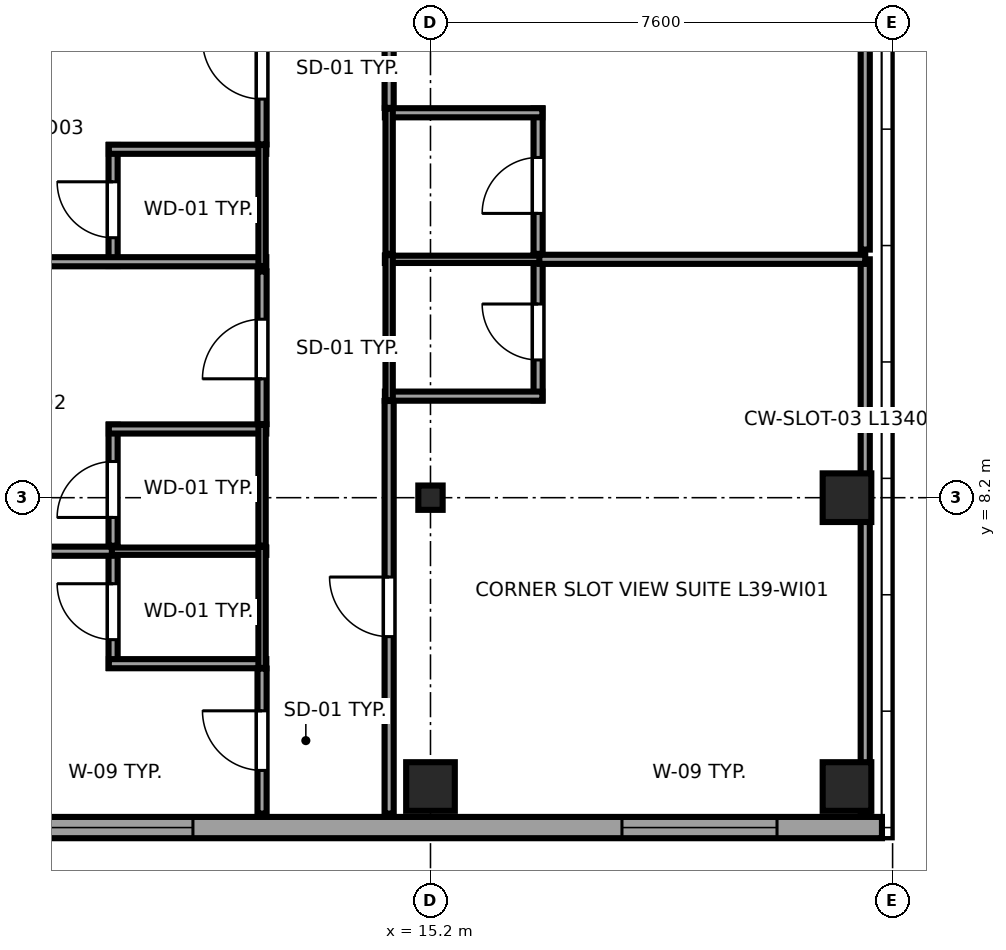
"""IFC4 building model, lengths in metres.
Left out: names, types, materials, properties, quantities, classifications, styles, units other than length and angle.
Written with IfcOpenShell. Run it as: python <this file> out.ifc"""

import sys

from ifc_helpers import new_model, si_unit, direction, frame, frame_2d, origin, origin_2d, place, context, subcontext, project, spatial, rectangle, i_section, extrude, source, transform, mapped, element, fill, save


model = new_model("IFC4")
c1 = context("Model", 3, precision=1e-05, world=origin(), true_north=direction((0.0, 1.0)))
c2 = subcontext(c1, "Body", "Model", "MODEL_VIEW")
j1 = project(units=[si_unit("LENGTHUNIT", "METRE"), si_unit("PLANEANGLEUNIT", "RADIAN")], contexts=[c1])
p1 = place(None, origin())
s1 = spatial("IfcSite", under=j1, at=p1, CompositionType="ELEMENT")
p2 = place(p1, origin())
s2 = spatial("IfcBuilding", under=s1, at=p2, CompositionType="ELEMENT")
p3 = place(p2, frame((0.0, 0.0, 150.6)))
s3 = spatial("IfcBuildingStorey", under=s2, at=p3, CompositionType="ELEMENT", Elevation=150.6)
m1 = source(origin(), c2, "Body", "SweptSolid", [
    extrude(rectangle(XDim=0.8, YDim=0.8, at=origin_2d()), origin(), (0.0, 0.0, 1.0), 3.55),
])
p4 = place(p3, frame((15.2, 3.45, 0.0), z_axis=(0.0, 0.0, 1.0), x_axis=(1.0, 0.0, 0.0)))
e1 = element("IfcColumn", 1, at=p4, inside=s3, PredefinedType="COLUMN", context=c2, shape_type="MappedRepresentation", body=[
    mapped(m1, transform((0.0, 0.0, 0.0), x_axis=(1.0, 0.0, 0.0), y_axis=(0.0, 1.0, 0.0), z_axis=(0.0, 0.0, 1.0), scale=1.0)),
])
m2 = source(origin(), c2, "Body", "SweptSolid", [
    extrude(i_section(OverallWidth=0.4, OverallDepth=0.4, WebThickness=0.02, FlangeThickness=0.035, at=origin_2d()), origin(), (0.0, 0.0, 1.0), 3.55),
])
p5 = place(p3, frame((15.2, 8.2, 0.0), z_axis=(0.0, 0.0, 1.0), x_axis=(1.0, 0.0, 0.0)))
e2 = element("IfcColumn", 2, at=p5, inside=s3, PredefinedType="COLUMN", context=c2, shape_type="MappedRepresentation", body=[
    mapped(m2, transform((0.0, 0.0, 0.0), x_axis=(1.0, 0.0, 0.0), y_axis=(0.0, 1.0, 0.0), z_axis=(0.0, 0.0, 1.0), scale=1.0)),
])
for number, where, z_axis, x_axis in (
    (3, (22.05, 3.45, 0.0), (0.0, 0.0, 1.0), (1.0, 0.0, 0.0)),
    (4, (22.05, 8.2, 0.0), (0.0, 0.0, 1.0), (1.0, 0.0, 0.0)),
):
    element("IfcColumn", number, at=place(p3, frame(where, z_axis=z_axis, x_axis=x_axis)), inside=s3, PredefinedType="COLUMN", context=c2, shape_type="MappedRepresentation", body=[
        mapped(m1, transform((0.0, 0.0, 0.0), x_axis=(1.0, 0.0, 0.0), y_axis=(0.0, 1.0, 0.0), z_axis=(0.0, 0.0, 1.0), scale=1.0)),
    ])
p6 = place(p3, frame((7.017, 2.775, 0.0), z_axis=(0.0, 0.0, 1.0), x_axis=(1.0, 0.0, 0.0)))
e5 = element("IfcWall", 5, at=p6, inside=s3, PredefinedType="SOLIDWALL", context=c2, shape_type="SweptSolid", body=[
    extrude(rectangle(XDim=15.608, YDim=0.35, at=frame_2d((7.804, 0.0))), origin(), (0.0, 0.0, 1.0), 3.37),
])
p7 = place(p6, frame((1.726, 0.0, 0.68)))
e6 = element("IfcOpeningElement", 6, at=p7, cuts=e5, PredefinedType="OPENING", context=c2, shape_type="SweptSolid", body=[
    extrude(rectangle(XDim=2.55, YDim=1.92, at=frame_2d((1.275, 0.96))), frame((0.0, 0.185, 0.0), z_axis=(0.0, -1.0, 0.0), x_axis=(1.0, 0.0, 0.0)), (0.0, 0.0, 1.0), 0.37),
])
p8 = place(p6, frame((11.332, 0.0, 0.68)))
e7 = element("IfcOpeningElement", 7, at=p8, cuts=e5, PredefinedType="OPENING", context=c2, shape_type="SweptSolid", body=[
    extrude(rectangle(XDim=2.55, YDim=1.92, at=frame_2d((1.275, 0.96))), frame((0.0, 0.185, 0.0), z_axis=(0.0, -1.0, 0.0), x_axis=(1.0, 0.0, 0.0)), (0.0, 0.0, 1.0), 0.37),
])
p9 = place(p3, frame((9.98, 5.4, 0.0), z_axis=(0.0, 0.0, 1.0), x_axis=(0.0, 1.0, 0.0)))
e8 = element("IfcWall", 8, at=p9, inside=s3, PredefinedType="PARTITIONING", context=c2, shape_type="SweptSolid", body=[
    extrude(rectangle(XDim=1.99, YDim=0.15, at=frame_2d((0.995, 0.0))), origin(), (0.0, 0.0, 1.0), 3.37),
])
p10 = place(p9, frame((0.465, 0.0, 0.0)))
e9 = element("IfcOpeningElement", 9, at=p10, cuts=e8, PredefinedType="OPENING", context=c2, shape_type="SweptSolid", body=[
    extrude(rectangle(XDim=0.92, YDim=2.01, at=frame_2d((0.46, 1.005))), frame((0.0, 0.085, 0.0), z_axis=(0.0, -1.0, 0.0), x_axis=(1.0, 0.0, 0.0)), (0.0, 0.0, 1.0), 0.17),
])
p11 = place(p3, frame((9.91, 5.47, 0.0), z_axis=(0.0, 0.0, 1.0), x_axis=(1.0, 0.0, 0.0)))
e10 = element("IfcWall", 10, at=p11, inside=s3, PredefinedType="PARTITIONING", context=c2, shape_type="SweptSolid", body=[
    extrude(rectangle(XDim=2.59, YDim=0.15, at=frame_2d((1.295, 0.0))), origin(), (0.0, 0.0, 1.0), 3.37),
])
p12 = place(p3, frame((9.91, 7.32, 0.0), z_axis=(0.0, 0.0, 1.0), x_axis=(1.0, 0.0, 0.0)))
e11 = element("IfcWall", 11, at=p12, inside=s3, PredefinedType="PLUMBINGWALL", context=c2, shape_type="SweptSolid", body=[
    extrude(rectangle(XDim=2.59, YDim=0.12, at=frame_2d((1.295, 0.0))), origin(), (0.0, 0.0, 1.0), 3.37),
])
p13 = place(p3, frame((12.43, 5.4, 0.0), z_axis=(0.0, 0.0, 1.0), x_axis=(0.0, 1.0, 0.0)))
e12 = element("IfcWall", 12, at=p13, inside=s3, PredefinedType="PLUMBINGWALL", context=c2, shape_type="SweptSolid", body=[
    extrude(rectangle(XDim=1.99, YDim=0.12, at=frame_2d((0.995, 0.0))), origin(), (0.0, 0.0, 1.0), 3.37),
])
p14 = place(p3, frame((9.98, 7.41, 0.0), z_axis=(0.0, 0.0, 1.0), x_axis=(0.0, 1.0, 0.0)))
e13 = element("IfcWall", 13, at=p14, inside=s3, PredefinedType="PARTITIONING", context=c2, shape_type="SweptSolid", body=[
    extrude(rectangle(XDim=1.99, YDim=0.15, at=frame_2d((0.995, 0.0))), origin(), (0.0, 0.0, 1.0), 3.37),
])
p15 = place(p14, frame((0.465, 0.0, 0.0)))
e14 = element("IfcOpeningElement", 14, at=p15, cuts=e13, PredefinedType="OPENING", context=c2, shape_type="SweptSolid", body=[
    extrude(rectangle(XDim=0.92, YDim=2.01, at=frame_2d((0.46, 1.005))), frame((0.0, 0.085, 0.0), z_axis=(0.0, -1.0, 0.0), x_axis=(1.0, 0.0, 0.0)), (0.0, 0.0, 1.0), 0.17),
])
p16 = place(p3, frame((9.91, 9.33, 0.0), z_axis=(0.0, 0.0, 1.0), x_axis=(1.0, 0.0, 0.0)))
e15 = element("IfcWall", 15, at=p16, inside=s3, PredefinedType="PARTITIONING", context=c2, shape_type="SweptSolid", body=[
    extrude(rectangle(XDim=2.59, YDim=0.15, at=frame_2d((1.295, 0.0))), origin(), (0.0, 0.0, 1.0), 3.37),
])
p17 = place(p3, frame((12.43, 7.41, 0.0), z_axis=(0.0, 0.0, 1.0), x_axis=(0.0, 1.0, 0.0)))
e16 = element("IfcWall", 16, at=p17, inside=s3, PredefinedType="PLUMBINGWALL", context=c2, shape_type="SweptSolid", body=[
    extrude(rectangle(XDim=1.99, YDim=0.12, at=frame_2d((0.995, 0.0))), origin(), (0.0, 0.0, 1.0), 3.37),
])
p18 = place(p3, frame((9.98, 12.01, 0.0), z_axis=(0.0, 0.0, 1.0), x_axis=(0.0, 1.0, 0.0)))
e17 = element("IfcWall", 17, at=p18, inside=s3, PredefinedType="PARTITIONING", context=c2, shape_type="SweptSolid", body=[
    extrude(rectangle(XDim=1.99, YDim=0.15, at=frame_2d((0.995, 0.0))), origin(), (0.0, 0.0, 1.0), 3.37),
])
p19 = place(p18, frame((0.465, 0.0, 0.0)))
e18 = element("IfcOpeningElement", 18, at=p19, cuts=e17, PredefinedType="OPENING", context=c2, shape_type="SweptSolid", body=[
    extrude(rectangle(XDim=0.92, YDim=2.01, at=frame_2d((0.46, 1.005))), frame((0.0, 0.085, 0.0), z_axis=(0.0, -1.0, 0.0), x_axis=(1.0, 0.0, 0.0)), (0.0, 0.0, 1.0), 0.17),
])
p20 = place(p3, frame((3.005, 12.08, 0.0), z_axis=(0.0, 0.0, 1.0), x_axis=(1.0, 0.0, 0.0)))
e19 = element("IfcWall", 19, at=p20, inside=s3, PredefinedType="PARTITIONING", context=c2, shape_type="SweptSolid", body=[
    extrude(rectangle(XDim=9.495, YDim=0.15, at=frame_2d((4.748, 0.0))), origin(), (0.0, 0.0, 1.0), 3.37),
])
p21 = place(p3, frame((9.91, 13.93, 0.0), z_axis=(0.0, 0.0, 1.0), x_axis=(1.0, 0.0, 0.0)))
e20 = element("IfcWall", 20, at=p21, inside=s3, PredefinedType="PARTITIONING", context=c2, shape_type="SweptSolid", body=[
    extrude(rectangle(XDim=2.59, YDim=0.15, at=frame_2d((1.295, 0.0))), origin(), (0.0, 0.0, 1.0), 3.37),
])
p22 = place(p3, frame((12.43, 12.01, 0.0), z_axis=(0.0, 0.0, 1.0), x_axis=(0.0, 1.0, 0.0)))
e21 = element("IfcWall", 21, at=p22, inside=s3, PredefinedType="PLUMBINGWALL", context=c2, shape_type="SweptSolid", body=[
    extrude(rectangle(XDim=1.99, YDim=0.12, at=frame_2d((0.995, 0.0))), origin(), (0.0, 0.0, 1.0), 3.37),
])
p23 = place(p3, frame((16.97, 9.8, 0.0), z_axis=(0.0, 0.0, 1.0), x_axis=(0.0, 1.0, 0.0)))
e22 = element("IfcWall", 22, at=p23, inside=s3, PredefinedType="PARTITIONING", context=c2, shape_type="SweptSolid", body=[
    extrude(rectangle(XDim=2.39, YDim=0.15, at=frame_2d((1.195, 0.0))), origin(), (0.0, 0.0, 1.0), 3.37),
])
p24 = place(p23, frame((0.665, 0.0, 0.0)))
e23 = element("IfcOpeningElement", 23, at=p24, cuts=e22, PredefinedType="OPENING", context=c2, shape_type="SweptSolid", body=[
    extrude(rectangle(XDim=0.92, YDim=2.01, at=frame_2d((0.46, 1.005))), frame((0.0, 0.085, 0.0), z_axis=(0.0, -1.0, 0.0), x_axis=(1.0, 0.0, 0.0)), (0.0, 0.0, 1.0), 0.17),
])
p25 = place(p3, frame((14.45, 9.87, 0.0), z_axis=(0.0, 0.0, 1.0), x_axis=(1.0, 0.0, 0.0)))
e24 = element("IfcWall", 24, at=p25, inside=s3, PredefinedType="PARTITIONING", context=c2, shape_type="SweptSolid", body=[
    extrude(rectangle(XDim=2.59, YDim=0.15, at=frame_2d((1.295, 0.0))), origin(), (0.0, 0.0, 1.0), 3.37),
])
p26 = place(p3, frame((14.45, 12.12, 0.0), z_axis=(0.0, 0.0, 1.0), x_axis=(1.0, 0.0, 0.0)))
e25 = element("IfcWall", 25, at=p26, inside=s3, PredefinedType="PLUMBINGWALL", context=c2, shape_type="SweptSolid", body=[
    extrude(rectangle(XDim=2.59, YDim=0.12, at=frame_2d((1.295, 0.0))), origin(), (0.0, 0.0, 1.0), 3.37),
])
p27 = place(p3, frame((14.52, 9.8, 0.0), z_axis=(0.0, 0.0, 1.0), x_axis=(0.0, 1.0, 0.0)))
e26 = element("IfcWall", 26, at=p27, inside=s3, PredefinedType="PLUMBINGWALL", context=c2, shape_type="SweptSolid", body=[
    extrude(rectangle(XDim=2.39, YDim=0.12, at=frame_2d((1.195, 0.0))), origin(), (0.0, 0.0, 1.0), 3.37),
])
p28 = place(p3, frame((16.97, 12.21, 0.0), z_axis=(0.0, 0.0, 1.0), x_axis=(0.0, 1.0, 0.0)))
e27 = element("IfcWall", 27, at=p28, inside=s3, PredefinedType="PARTITIONING", context=c2, shape_type="SweptSolid", body=[
    extrude(rectangle(XDim=2.39, YDim=0.15, at=frame_2d((1.195, 0.0))), origin(), (0.0, 0.0, 1.0), 3.37),
])
p29 = place(p28, frame((0.665, 0.0, 0.0)))
e28 = element("IfcOpeningElement", 28, at=p29, cuts=e27, PredefinedType="OPENING", context=c2, shape_type="SweptSolid", body=[
    extrude(rectangle(XDim=0.92, YDim=2.01, at=frame_2d((0.46, 1.005))), frame((0.0, 0.085, 0.0), z_axis=(0.0, -1.0, 0.0), x_axis=(1.0, 0.0, 0.0)), (0.0, 0.0, 1.0), 0.17),
])
p30 = place(p3, frame((14.45, 14.53, 0.0), z_axis=(0.0, 0.0, 1.0), x_axis=(1.0, 0.0, 0.0)))
e29 = element("IfcWall", 29, at=p30, inside=s3, PredefinedType="PARTITIONING", context=c2, shape_type="SweptSolid", body=[
    extrude(rectangle(XDim=2.59, YDim=0.15, at=frame_2d((1.295, 0.0))), origin(), (0.0, 0.0, 1.0), 3.37),
])
p31 = place(p3, frame((14.52, 12.21, 0.0), z_axis=(0.0, 0.0, 1.0), x_axis=(0.0, 1.0, 0.0)))
e30 = element("IfcWall", 30, at=p31, inside=s3, PredefinedType="PLUMBINGWALL", context=c2, shape_type="SweptSolid", body=[
    extrude(rectangle(XDim=2.39, YDim=0.12, at=frame_2d((1.195, 0.0))), origin(), (0.0, 0.0, 1.0), 3.37),
])
p32 = place(p3, frame((12.43, 3.005, 0.0), z_axis=(0.0, 0.0, 1.0), x_axis=(0.0, 1.0, 0.0)))
e31 = element("IfcWall", 31, at=p32, inside=s3, PredefinedType="PARTITIONING", context=c2, shape_type="SweptSolid", body=[
    extrude(rectangle(XDim=2.385, YDim=0.15, at=frame_2d((1.192, 0.0))), origin(), (0.0, 0.0, 1.0), 3.37),
])
p33 = place(p32, frame((0.71, 0.0, 0.0)))
e32 = element("IfcOpeningElement", 32, at=p33, cuts=e31, PredefinedType="OPENING", context=c2, shape_type="SweptSolid", body=[
    extrude(rectangle(XDim=0.98, YDim=2.12, at=frame_2d((0.49, 1.06))), frame((0.0, 0.085, 0.0), z_axis=(0.0, -1.0, 0.0), x_axis=(1.0, 0.0, 0.0)), (0.0, 0.0, 1.0), 0.17),
])
p34 = place(p3, frame((3.005, 7.32, 0.0), z_axis=(0.0, 0.0, 1.0), x_axis=(1.0, 0.0, 0.0)))
e33 = element("IfcWall", 33, at=p34, inside=s3, PredefinedType="PARTITIONING", context=c2, shape_type="SweptSolid", body=[
    extrude(rectangle(XDim=6.955, YDim=0.15, at=frame_2d((3.478, 0.0))), origin(), (0.0, 0.0, 1.0), 3.37),
])
p35 = place(p3, frame((12.43, 9.41, 0.0), z_axis=(0.0, 0.0, 1.0), x_axis=(0.0, 1.0, 0.0)))
e34 = element("IfcWall", 34, at=p35, inside=s3, PredefinedType="PARTITIONING", context=c2, shape_type="SweptSolid", body=[
    extrude(rectangle(XDim=2.51, YDim=0.15, at=frame_2d((1.255, 0.0))), origin(), (0.0, 0.0, 1.0), 3.37),
])
p36 = place(p35, frame((0.745, 0.0, 0.0)))
e35 = element("IfcOpeningElement", 35, at=p36, cuts=e34, PredefinedType="OPENING", context=c2, shape_type="SweptSolid", body=[
    extrude(rectangle(XDim=0.98, YDim=2.12, at=frame_2d((0.49, 1.06))), frame((0.0, 0.085, 0.0), z_axis=(0.0, -1.0, 0.0), x_axis=(1.0, 0.0, 0.0)), (0.0, 0.0, 1.0), 0.17),
])
p37 = place(p3, frame((12.43, 14.01, 0.0), z_axis=(0.0, 0.0, 1.0), x_axis=(0.0, 1.0, 0.0)))
e36 = element("IfcWall", 36, at=p37, inside=s3, PredefinedType="PARTITIONING", context=c2, shape_type="SweptSolid", body=[
    extrude(rectangle(XDim=2.51, YDim=0.15, at=frame_2d((1.255, 0.0))), origin(), (0.0, 0.0, 1.0), 3.37),
])
p38 = place(p37, frame((0.745, 0.0, 0.0)))
e37 = element("IfcOpeningElement", 37, at=p38, cuts=e36, PredefinedType="OPENING", context=c2, shape_type="SweptSolid", body=[
    extrude(rectangle(XDim=0.98, YDim=2.12, at=frame_2d((0.49, 1.06))), frame((0.0, 0.085, 0.0), z_axis=(0.0, -1.0, 0.0), x_axis=(1.0, 0.0, 0.0)), (0.0, 0.0, 1.0), 0.17),
])
p39 = place(p3, frame((14.52, 3.005, 0.0), z_axis=(0.0, 0.0, 1.0), x_axis=(0.0, 1.0, 0.0)))
e38 = element("IfcWall", 38, at=p39, inside=s3, PredefinedType="PARTITIONING", context=c2, shape_type="SweptSolid", body=[
    extrude(rectangle(XDim=6.785, YDim=0.15, at=frame_2d((3.393, 0.0))), origin(), (0.0, 0.0, 1.0), 3.37),
])
p40 = place(p39, frame((2.91, 0.0, 0.0)))
e39 = element("IfcOpeningElement", 39, at=p40, cuts=e38, PredefinedType="OPENING", context=c2, shape_type="SweptSolid", body=[
    extrude(rectangle(XDim=0.98, YDim=2.12, at=frame_2d((0.49, 1.06))), frame((0.0, 0.085, 0.0), z_axis=(0.0, -1.0, 0.0), x_axis=(1.0, 0.0, 0.0)), (0.0, 0.0, 1.0), 0.17),
])
p41 = place(p3, frame((22.35, 3.005, 0.0), z_axis=(0.0, 0.0, 1.0), x_axis=(0.0, 1.0, 0.0)))
e40 = element("IfcWall", 40, at=p41, inside=s3, PredefinedType="PARTITIONING", context=c2, shape_type="SweptSolid", body=[
    extrude(rectangle(XDim=9.115, YDim=0.15, at=frame_2d((4.558, 0.0))), origin(), (0.0, 0.0, 1.0), 2.16),
])
p42 = place(p3, frame((16.99, 12.12, 0.0), z_axis=(0.0, 0.0, 1.0), x_axis=(1.0, 0.0, 0.0)))
e41 = element("IfcWall", 41, at=p42, inside=s3, PredefinedType="PARTITIONING", context=c2, shape_type="SweptSolid", body=[
    extrude(rectangle(XDim=5.36, YDim=0.15, at=frame_2d((2.68, 0.0))), origin(), (0.0, 0.0, 1.0), 3.37),
])
p43 = place(p3, frame((14.52, 14.61, 0.0), z_axis=(0.0, 0.0, 1.0), x_axis=(0.0, 1.0, 0.0)))
e42 = element("IfcWall", 42, at=p43, inside=s3, PredefinedType="PARTITIONING", context=c2, shape_type="SweptSolid", body=[
    extrude(rectangle(XDim=6.61, YDim=0.15, at=frame_2d((3.305, 0.0))), origin(), (0.0, 0.0, 1.0), 3.37),
])
p44 = place(p43, frame((2.795, 0.0, 0.0)))
e43 = element("IfcOpeningElement", 43, at=p44, cuts=e42, PredefinedType="OPENING", context=c2, shape_type="SweptSolid", body=[
    extrude(rectangle(XDim=0.98, YDim=2.12, at=frame_2d((0.49, 1.06))), frame((0.0, 0.085, 0.0), z_axis=(0.0, -1.0, 0.0), x_axis=(1.0, 0.0, 0.0)), (0.0, 0.0, 1.0), 0.17),
])
p45 = place(p3, frame((22.35, 12.28, 0.0), z_axis=(0.0, 0.0, 1.0), x_axis=(0.0, 1.0, 0.0)))
e44 = element("IfcWall", 44, at=p45, inside=s3, PredefinedType="PARTITIONING", context=c2, shape_type="SweptSolid", body=[
    extrude(rectangle(XDim=8.94, YDim=0.15, at=frame_2d((4.47, 0.0))), origin(), (0.0, 0.0, 1.0), 2.16),
])
m3 = source(origin(), c2, "Body", "SweptSolid", [
    extrude(rectangle(XDim=2.55, YDim=1.92, at=frame_2d((1.275, 0.96))), frame((0.0, 0.09, 0.0), z_axis=(0.0, -1.0, 0.0), x_axis=(1.0, 0.0, 0.0)), (0.0, 0.0, 1.0), 0.06),
])
p46 = place(p7, origin())
e45 = element("IfcWindow", 45, at=p46, inside=s3, PartitioningType="TRIPLE_PANEL_HORIZONTAL", PredefinedType="WINDOW", context=c2, shape_type="MappedRepresentation", body=[
    mapped(m3, transform((0.0, 0.0, 0.0), x_axis=(1.0, 0.0, 0.0), y_axis=(0.0, 1.0, 0.0), z_axis=(0.0, 0.0, 1.0), scale=1.0)),
])
fill(e6, e45)
p47 = place(p8, origin())
e46 = element("IfcWindow", 46, at=p47, inside=s3, PartitioningType="TRIPLE_PANEL_HORIZONTAL", PredefinedType="WINDOW", context=c2, shape_type="MappedRepresentation", body=[
    mapped(m3, transform((0.0, 0.0, 0.0), x_axis=(1.0, 0.0, 0.0), y_axis=(0.0, 1.0, 0.0), z_axis=(0.0, 0.0, 1.0), scale=1.0)),
])
fill(e7, e46)
m4 = source(origin(), c2, "Body", "SweptSolid", [
    extrude(rectangle(XDim=0.92, YDim=2.01, at=frame_2d((0.46, 1.005))), frame((0.0, 0.025, 0.0), z_axis=(0.0, -1.0, 0.0), x_axis=(1.0, 0.0, 0.0)), (0.0, 0.0, 1.0), 0.05),
])
p48 = place(p10, origin())
e47 = element("IfcDoor", 47, at=p48, inside=s3, OperationType="SINGLE_SWING_RIGHT", PredefinedType="DOOR", context=c2, shape_type="MappedRepresentation", body=[
    mapped(m4, transform((0.0, 0.0, 0.0), x_axis=(1.0, 0.0, 0.0), y_axis=(0.0, 1.0, 0.0), z_axis=(0.0, 0.0, 1.0), scale=1.0)),
])
fill(e9, e47)
p49 = place(p15, origin())
e48 = element("IfcDoor", 48, at=p49, inside=s3, OperationType="SINGLE_SWING_LEFT", PredefinedType="DOOR", context=c2, shape_type="MappedRepresentation", body=[
    mapped(m4, transform((0.0, 0.0, 0.0), x_axis=(1.0, 0.0, 0.0), y_axis=(0.0, 1.0, 0.0), z_axis=(0.0, 0.0, 1.0), scale=1.0)),
])
fill(e14, e48)
p50 = place(p19, origin())
e49 = element("IfcDoor", 49, at=p50, inside=s3, OperationType="SINGLE_SWING_RIGHT", PredefinedType="DOOR", context=c2, shape_type="MappedRepresentation", body=[
    mapped(m4, transform((0.0, 0.0, 0.0), x_axis=(1.0, 0.0, 0.0), y_axis=(0.0, 1.0, 0.0), z_axis=(0.0, 0.0, 1.0), scale=1.0)),
])
fill(e18, e49)
p51 = place(p24, origin())
e50 = element("IfcDoor", 50, at=p51, inside=s3, OperationType="SINGLE_SWING_RIGHT", PredefinedType="DOOR", context=c2, shape_type="MappedRepresentation", body=[
    mapped(m4, transform((0.0, 0.0, 0.0), x_axis=(1.0, 0.0, 0.0), y_axis=(0.0, 1.0, 0.0), z_axis=(0.0, 0.0, 1.0), scale=1.0)),
])
fill(e23, e50)
p52 = place(p29, origin())
e51 = element("IfcDoor", 51, at=p52, inside=s3, OperationType="SINGLE_SWING_LEFT", PredefinedType="DOOR", context=c2, shape_type="MappedRepresentation", body=[
    mapped(m4, transform((0.0, 0.0, 0.0), x_axis=(1.0, 0.0, 0.0), y_axis=(0.0, 1.0, 0.0), z_axis=(0.0, 0.0, 1.0), scale=1.0)),
])
fill(e28, e51)
m5 = source(origin(), c2, "Body", "SweptSolid", [
    extrude(rectangle(XDim=0.98, YDim=2.12, at=frame_2d((0.49, 1.06))), frame((0.0, 0.025, 0.0), z_axis=(0.0, -1.0, 0.0), x_axis=(1.0, 0.0, 0.0)), (0.0, 0.0, 1.0), 0.05),
])
p53 = place(p33, origin())
e52 = element("IfcDoor", 52, at=p53, inside=s3, OperationType="SINGLE_SWING_RIGHT", PredefinedType="DOOR", context=c2, shape_type="MappedRepresentation", body=[
    mapped(m5, transform((0.0, 0.0, 0.0), x_axis=(1.0, 0.0, 0.0), y_axis=(0.0, 1.0, 0.0), z_axis=(0.0, 0.0, 1.0), scale=1.0)),
])
fill(e32, e52)
p54 = place(p36, origin())
e53 = element("IfcDoor", 53, at=p54, inside=s3, OperationType="SINGLE_SWING_LEFT", PredefinedType="DOOR", context=c2, shape_type="MappedRepresentation", body=[
    mapped(m5, transform((0.0, 0.0, 0.0), x_axis=(1.0, 0.0, 0.0), y_axis=(0.0, 1.0, 0.0), z_axis=(0.0, 0.0, 1.0), scale=1.0)),
])
fill(e35, e53)
p55 = place(p38, origin())
e54 = element("IfcDoor", 54, at=p55, inside=s3, OperationType="SINGLE_SWING_RIGHT", PredefinedType="DOOR", context=c2, shape_type="MappedRepresentation", body=[
    mapped(m5, transform((0.0, 0.0, 0.0), x_axis=(1.0, 0.0, 0.0), y_axis=(0.0, 1.0, 0.0), z_axis=(0.0, 0.0, 1.0), scale=1.0)),
])
fill(e37, e54)
p56 = place(p40, origin())
e55 = element("IfcDoor", 55, at=p56, inside=s3, OperationType="SINGLE_SWING_RIGHT", PredefinedType="DOOR", context=c2, shape_type="MappedRepresentation", body=[
    mapped(m5, transform((0.0, 0.0, 0.0), x_axis=(1.0, 0.0, 0.0), y_axis=(0.0, 1.0, 0.0), z_axis=(0.0, 0.0, 1.0), scale=1.0)),
])
fill(e39, e55)
save(model, sys.argv[1])
